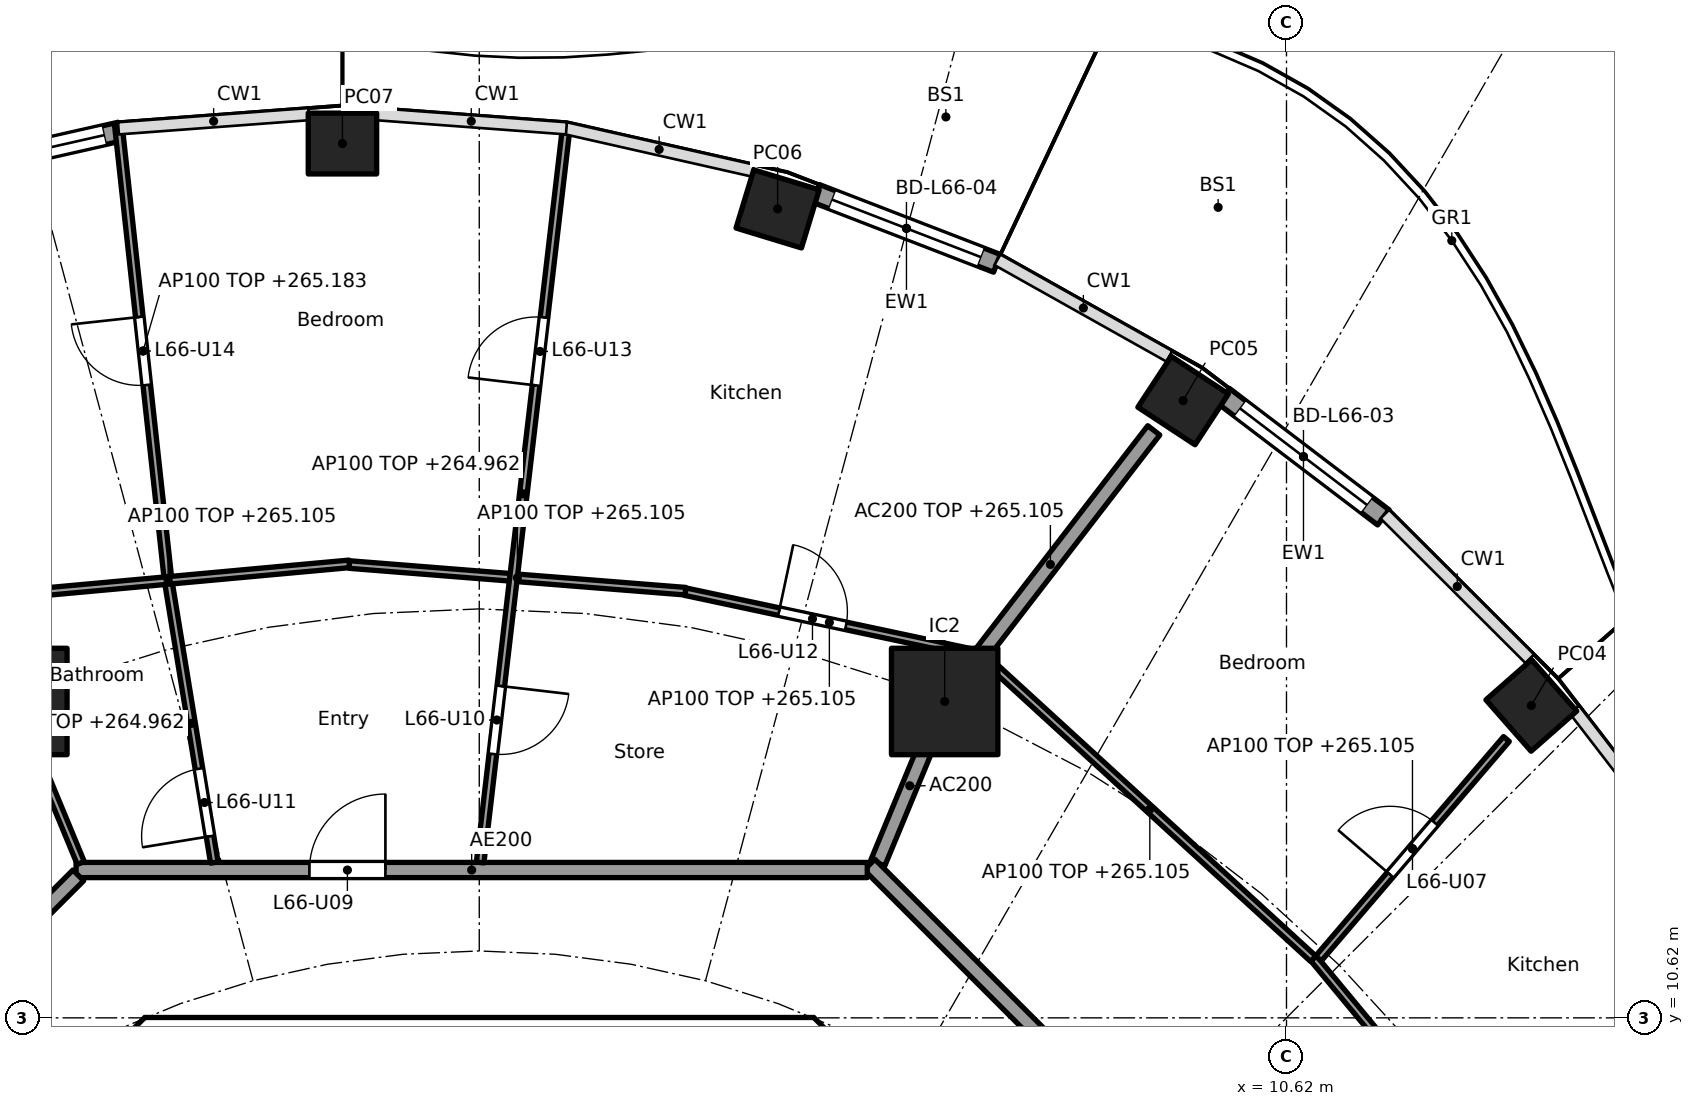
"""IFC4 building model, lengths in metres.
Left out: names, types, materials, properties, quantities, classifications, styles, units other than length and angle.
Written with IfcOpenShell. Run it as: python <this file> out.ifc"""

import sys

from ifc_helpers import new_model, si_unit, direction, frame, frame_2d, origin, origin_2d, place, context, subcontext, project, spatial, polyline, rectangle, hollow_rectangle, outline, extrude, element, fill, save


model = new_model("IFC4")
c1 = context("Model", 3, precision=1e-05, world=origin(), true_north=direction((0.0, 1.0)))
c2 = subcontext(c1, "Body", "Model", "MODEL_VIEW")
j1 = project(units=[si_unit("LENGTHUNIT", "METRE"), si_unit("PLANEANGLEUNIT", "RADIAN")], contexts=[c1])
p1 = place(None, origin())
s1 = spatial("IfcSite", under=j1, at=p1, CompositionType="ELEMENT")
p2 = place(p1, origin())
s2 = spatial("IfcBuilding", under=s1, at=p2, CompositionType="ELEMENT")
p3 = place(p2, frame((0.0, 0.0, 262.2)))
s3 = spatial("IfcBuildingStorey", under=s2, at=p3, CompositionType="ELEMENT", Elevation=262.2)
for number, where, z_axis, x_axis in (
    (1, (13.841, 14.73, 0.0), (0.0, 0.0, 1.0), (-0.66, 0.751, 0.0)),
    (2, (9.26, 18.741, 0.0), (0.0, 0.0, 1.0), (-0.836, 0.549, 0.0)),
    (3, (3.925, 21.262, 0.0), (0.0, 0.0, 1.0), (-0.957, 0.292, 0.0)),
    (4, (-1.8, 22.122, 0.0), (0.0, 0.0, 1.0), (-1.0, 0.0, 0.0)),
):
    element("IfcColumn", number, at=place(p3, frame(where, z_axis=z_axis, x_axis=x_axis)), inside=s3, PredefinedType="COLUMN", context=c2, shape_type="SweptSolid", body=[
        extrude(hollow_rectangle(XDim=0.9, YDim=0.8, WallThickness=0.028, at=origin_2d()), origin(), (0.0, 0.0, 1.0), 3.7),
    ])
for number, where, z_axis, x_axis in (
    (5, (6.123, 14.782, 0.0), (0.0, 0.0, 1.0), (1.0, 0.0, 0.0)),
    (6, (-6.123, 14.782, 0.0), (0.0, 0.0, 1.0), (1.0, 0.0, 0.0)),
):
    element("IfcColumn", number, at=place(p3, frame(where, z_axis=z_axis, x_axis=x_axis)), inside=s3, PredefinedType="COLUMN", context=c2, shape_type="SweptSolid", body=[
        extrude(rectangle(XDim=1.4, YDim=1.4, at=origin_2d()), origin(), (0.0, 0.0, 1.0), 3.7),
    ])
p4 = place(p3, frame((9.792, 18.802, 0.0), z_axis=(0.0, 0.0, 1.0), x_axis=(0.796010739377, -0.605282498339, 0.0)))
e7 = element("IfcWall", 7, at=p4, inside=s3, PredefinedType="SOLIDWALL", context=c2, shape_type="SweptSolid", body=[
    extrude(rectangle(XDim=2.641, YDim=0.25, at=frame_2d((1.32, 0.0))), origin(), (0.0, 0.0, 1.0), 3.44),
])
p5 = place(p4, frame((0.27, 0.0, 0.0)))
e8 = element("IfcOpeningElement", 8, at=p5, cuts=e7, PredefinedType="OPENING", context=c2, shape_type="SweptSolid", body=[
    extrude(rectangle(XDim=2.1, YDim=2.4, at=frame_2d((1.05, 1.2))), frame((0.0, 0.135, 0.0), z_axis=(0.0, -1.0, 0.0), x_axis=(1.0, 0.0, 0.0)), (0.0, 0.0, 1.0), 0.27),
])
p6 = place(p3, frame((4.429, 21.467, 0.0), z_axis=(0.0, 0.0, 1.0), x_axis=(0.93282223778, -0.360336887792, 0.0)))
e9 = element("IfcWall", 9, at=p6, inside=s3, PredefinedType="SOLIDWALL", context=c2, shape_type="SweptSolid", body=[
    extrude(rectangle(XDim=2.554, YDim=0.25, at=frame_2d((1.277, 0.0))), origin(), (0.0, 0.0, 1.0), 3.44),
])
p7 = place(p6, frame((0.227, 0.0, 0.0)))
e10 = element("IfcOpeningElement", 10, at=p7, cuts=e9, PredefinedType="OPENING", context=c2, shape_type="SweptSolid", body=[
    extrude(rectangle(XDim=2.1, YDim=2.4, at=frame_2d((1.05, 1.2))), frame((0.0, 0.135, 0.0), z_axis=(0.0, -1.0, 0.0), x_axis=(1.0, 0.0, 0.0)), (0.0, 0.0, 1.0), 0.27),
])
p8 = place(p3, frame((-7.188, 21.723, 0.0), z_axis=(0.0, 0.0, 1.0), x_axis=(0.975319584032, 0.220797891756, 0.0)))
e11 = element("IfcWall", 11, at=p8, inside=s3, PredefinedType="SOLIDWALL", context=c2, shape_type="SweptSolid", body=[
    extrude(rectangle(XDim=2.525, YDim=0.25, at=frame_2d((1.263, 0.0))), origin(), (0.0, 0.0, 1.0), 3.44),
])
p9 = place(p8, frame((0.213, 0.0, 0.0)))
e12 = element("IfcOpeningElement", 12, at=p9, cuts=e11, PredefinedType="OPENING", context=c2, shape_type="SweptSolid", body=[
    extrude(rectangle(XDim=2.1, YDim=2.4, at=frame_2d((1.05, 1.2))), frame((0.0, 0.135, 0.0), z_axis=(0.0, -1.0, 0.0), x_axis=(1.0, 0.0, 0.0)), (0.0, 0.0, 1.0), 0.27),
])
p10 = place(p3, origin())
e13 = element("IfcWall", 13, at=p10, inside=s3, PredefinedType="SHEAR", context=c2, shape_type="SweptSolid", body=[
    extrude(outline(polyline([(-4.152, 10.025), (-4.401, 9.776), (-4.825, 10.2), (-4.401, 10.625), (4.401, 10.625), (4.825, 10.2), (4.401, 9.776), (4.152, 10.025), (-4.152, 10.025)])), origin(), (0.0, 0.0, 1.0), 3.44),
])
p11 = place(p3, frame((5.243, 12.657, 0.0), z_axis=(0.0, 0.0, 1.0), x_axis=(0.382691608661, 0.923876145736, 0.0)))
e14 = element("IfcWall", 14, at=p11, inside=s3, PredefinedType="PARTITIONING", context=c2, shape_type="SweptSolid", body=[
    extrude(rectangle(XDim=2.2, YDim=0.2, at=frame_2d((1.1, 0.0))), origin(), (0.0, 0.0, 1.0), 3.44),
])
p12 = place(p3, frame((6.154, 14.822, 0.0), z_axis=(0.0, 0.0, 1.0), x_axis=(0.610687612043, 0.791871606068, 0.0)))
e15 = element("IfcWall", 15, at=p12, inside=s3, PredefinedType="PARTITIONING", context=c2, shape_type="SweptSolid", body=[
    extrude(rectangle(XDim=4.455, YDim=0.2, at=frame_2d((2.228, 0.0))), origin(), (0.0, 0.0, 1.0), 2.905),
])
p13 = place(p3, frame((12.635, 5.134, 0.0), z_axis=(0.0, 0.0, 1.0), x_axis=(-0.707106781187, 0.707106781187, 0.0)))
e16 = element("IfcWall", 16, at=p13, inside=s3, PredefinedType="PARTITIONING", context=c2, shape_type="SweptSolid", body=[
    extrude(rectangle(XDim=10.609, YDim=0.2, at=frame_2d((5.305, 0.0))), origin(), (0.0, 0.0, 1.0), 3.44),
])
p14 = place(p3, frame((5.104, 12.565, 0.0), z_axis=(0.0, 0.0, 1.0), x_axis=(-1.0, 0.0, 0.0)))
e17 = element("IfcWall", 17, at=p14, inside=s3, PredefinedType="PARTITIONING", context=c2, shape_type="SweptSolid", body=[
    extrude(rectangle(XDim=10.409, YDim=0.2, at=frame_2d((5.205, 0.0))), origin(), (0.0, 0.0, 1.0), 3.44),
])
p15 = place(p14, frame((6.339, 0.0, 0.0)))
e18 = element("IfcOpeningElement", 18, at=p15, cuts=e17, PredefinedType="OPENING", context=c2, shape_type="SweptSolid", body=[
    extrude(rectangle(XDim=1.0, YDim=2.1, at=frame_2d((0.5, 1.05))), frame((0.0, 0.11, 0.0), z_axis=(0.0, -1.0, 0.0), x_axis=(1.0, 0.0, 0.0)), (0.0, 0.0, 1.0), 0.22),
])
p16 = place(p3, frame((-5.275, 12.494, 0.0), z_axis=(0.0, 0.0, 1.0), x_axis=(-0.707106781187, -0.707106781187, 0.0)))
e19 = element("IfcWall", 19, at=p16, inside=s3, PredefinedType="PARTITIONING", context=c2, shape_type="SweptSolid", body=[
    extrude(rectangle(XDim=10.209, YDim=0.2, at=frame_2d((5.104, 0.0))), origin(), (0.0, 0.0, 1.0), 3.44),
])
p17 = place(p3, frame((15.098, 6.427, 0.0), z_axis=(0.0, 0.0, 1.0), x_axis=(-0.637936555536, 0.770088924158, 0.0)))
e20 = element("IfcWall", 20, at=p17, inside=s3, PredefinedType="PARTITIONING", context=c2, shape_type="SweptSolid", body=[
    extrude(rectangle(XDim=6.46, YDim=0.1, at=frame_2d((3.23, 0.0))), origin(), (0.0, 0.0, 1.0), 2.905),
])
p18 = place(p17, frame((2.78, 0.0, 0.0)))
e21 = element("IfcOpeningElement", 21, at=p18, cuts=e20, PredefinedType="OPENING", context=c2, shape_type="SweptSolid", body=[
    extrude(rectangle(XDim=0.9, YDim=2.1, at=frame_2d((0.45, 1.05))), frame((0.0, 0.06, 0.0), z_axis=(0.0, -1.0, 0.0), x_axis=(1.0, 0.0, 0.0)), (0.0, 0.0, 1.0), 0.12),
])
p19 = place(p3, frame((11.041, 11.402, 0.0), z_axis=(0.0, 0.0, 1.0), x_axis=(0.650558544325, 0.759456108282, 0.0)))
e22 = element("IfcWall", 22, at=p19, inside=s3, PredefinedType="PARTITIONING", context=c2, shape_type="SweptSolid", body=[
    extrude(rectangle(XDim=3.8, YDim=0.1, at=frame_2d((1.9, 0.0))), origin(), (0.0, 0.0, 1.0), 2.905),
])
p20 = place(p19, frame((1.45, 0.0, 0.0)))
e23 = element("IfcOpeningElement", 23, at=p20, cuts=e22, PredefinedType="OPENING", context=c2, shape_type="SweptSolid", body=[
    extrude(rectangle(XDim=0.9, YDim=2.1, at=frame_2d((0.45, 1.05))), frame((0.0, 0.06, 0.0), z_axis=(0.0, -1.0, 0.0), x_axis=(1.0, 0.0, 0.0)), (0.0, 0.0, 1.0), 0.12),
])
p21 = place(p3, frame((10.972, 11.398, 0.0), z_axis=(0.0, 0.0, 1.0), x_axis=(-0.737830272434, 0.674986288069, 0.0)))
e24 = element("IfcWall", 24, at=p21, inside=s3, PredefinedType="PARTITIONING", context=c2, shape_type="SweptSolid", body=[
    extrude(rectangle(XDim=5.827, YDim=0.1, at=frame_2d((2.914, 0.0))), origin(), (0.0, 0.0, 1.0), 2.905),
])
p22 = place(p3, frame((6.5, 15.419, 0.0), z_axis=(0.0, 0.0, 1.0), x_axis=(-0.978053492557, 0.208353943321, 0.0)))
e25 = element("IfcWall", 25, at=p22, inside=s3, PredefinedType="PARTITIONING", context=c2, shape_type="SweptSolid", body=[
    extrude(rectangle(XDim=3.874, YDim=0.1, at=frame_2d((1.937, 0.0))), origin(), (0.0, 0.0, 1.0), 2.905),
])
p23 = place(p22, frame((1.714, 0.0, 0.0)))
e26 = element("IfcOpeningElement", 26, at=p23, cuts=e25, PredefinedType="OPENING", context=c2, shape_type="SweptSolid", body=[
    extrude(rectangle(XDim=0.9, YDim=2.1, at=frame_2d((0.45, 1.05))), frame((0.0, 0.06, 0.0), z_axis=(0.0, -1.0, 0.0), x_axis=(1.0, 0.0, 0.0)), (0.0, 0.0, 1.0), 0.12),
])
p24 = place(p3, frame((2.713, 16.233, 0.0), z_axis=(0.0, 0.0, 1.0), x_axis=(-0.996870142942, 0.079056423588, 0.0)))
e27 = element("IfcWall", 27, at=p24, inside=s3, PredefinedType="PARTITIONING", context=c2, shape_type="SweptSolid", body=[
    extrude(rectangle(XDim=4.438, YDim=0.1, at=frame_2d((2.219, 0.0))), origin(), (0.0, 0.0, 1.0), 2.905),
])
p25 = place(p3, frame((0.012, 12.664, 0.0), z_axis=(0.0, 0.0, 1.0), x_axis=(0.11636251357, 0.993206808996, 0.0)))
e28 = element("IfcWall", 28, at=p25, inside=s3, PredefinedType="PARTITIONING", context=c2, shape_type="SweptSolid", body=[
    extrude(rectangle(XDim=9.765, YDim=0.1, at=frame_2d((4.882, 0.0))), origin(), (0.0, 0.0, 1.0), 2.762),
])
p26 = place(p25, frame((1.437, 0.0, 0.0)))
e29 = element("IfcOpeningElement", 29, at=p26, cuts=e28, PredefinedType="OPENING", context=c2, shape_type="SweptSolid", body=[
    extrude(rectangle(XDim=0.9, YDim=2.1, at=frame_2d((0.45, 1.05))), frame((0.0, 0.06, 0.0), z_axis=(0.0, -1.0, 0.0), x_axis=(1.0, 0.0, 0.0)), (0.0, 0.0, 1.0), 0.12),
])
p27 = place(p25, frame((6.319, 0.0, 0.0)))
e30 = element("IfcOpeningElement", 30, at=p27, cuts=e28, PredefinedType="OPENING", context=c2, shape_type="SweptSolid", body=[
    extrude(rectangle(XDim=0.9, YDim=2.1, at=frame_2d((0.45, 1.05))), frame((0.0, 0.06, 0.0), z_axis=(0.0, -1.0, 0.0), x_axis=(1.0, 0.0, 0.0)), (0.0, 0.0, 1.0), 0.12),
])
p28 = place(p3, frame((-1.711, 16.592, 0.0), z_axis=(0.0, 0.0, 1.0), x_axis=(-0.995843707015, -0.091078599017, 0.0)))
e31 = element("IfcWall", 31, at=p28, inside=s3, PredefinedType="PARTITIONING", context=c2, shape_type="SweptSolid", body=[
    extrude(rectangle(XDim=4.785, YDim=0.1, at=frame_2d((2.392, 0.0))), origin(), (0.0, 0.0, 1.0), 2.905),
])
p29 = place(p3, frame((-3.486, 12.663, 0.0), z_axis=(0.0, 0.0, 1.0), x_axis=(-0.161602751674, 0.986855891532, 0.0)))
e32 = element("IfcWall", 32, at=p29, inside=s3, PredefinedType="PARTITIONING", context=c2, shape_type="SweptSolid", body=[
    extrude(rectangle(XDim=3.71, YDim=0.1, at=frame_2d((1.855, 0.0))), origin(), (0.0, 0.0, 1.0), 2.762),
])
p30 = place(p29, frame((0.35, 0.0, 0.0)))
e33 = element("IfcOpeningElement", 33, at=p30, cuts=e32, PredefinedType="OPENING", context=c2, shape_type="SweptSolid", body=[
    extrude(rectangle(XDim=0.9, YDim=2.1, at=frame_2d((0.45, 1.05))), frame((0.0, 0.06, 0.0), z_axis=(0.0, -1.0, 0.0), x_axis=(1.0, 0.0, 0.0)), (0.0, 0.0, 1.0), 0.12),
])
p31 = place(p3, frame((-4.099, 16.424, 0.0), z_axis=(0.0, 0.0, 1.0), x_axis=(-0.10867295252, 0.99407755703, 0.0)))
e34 = element("IfcWall", 34, at=p31, inside=s3, PredefinedType="PARTITIONING", context=c2, shape_type="SweptSolid", body=[
    extrude(rectangle(XDim=5.974, YDim=0.1, at=frame_2d((2.987, 0.0))), origin(), (0.0, 0.0, 1.0), 2.983),
])
p32 = place(p31, frame((2.537, 0.0, 0.0)))
e35 = element("IfcOpeningElement", 35, at=p32, cuts=e34, PredefinedType="OPENING", context=c2, shape_type="SweptSolid", body=[
    extrude(rectangle(XDim=0.9, YDim=2.1, at=frame_2d((0.45, 1.05))), frame((0.0, 0.06, 0.0), z_axis=(0.0, -1.0, 0.0), x_axis=(1.0, 0.0, 0.0)), (0.0, 0.0, 1.0), 0.12),
])
p33 = place(p3, frame((-5.243, 12.657, 0.0), z_axis=(0.0, 0.0, 1.0), x_axis=(-0.382719158442, 0.923864733477, 0.0)))
e36 = element("IfcWall", 36, at=p33, inside=s3, PredefinedType="PARTITIONING", context=c2, shape_type="SweptSolid", body=[
    extrude(rectangle(XDim=2.25, YDim=0.1, at=frame_2d((1.125, 0.0))), origin(), (0.0, 0.0, 1.0), 3.44),
])
p34 = place(p5, origin())
e37 = element("IfcDoor", 37, at=p34, inside=s3, OperationType="SLIDING_TO_LEFT", PredefinedType="DOOR", context=c2, shape_type="SweptSolid", body=[
    extrude(rectangle(XDim=2.1, YDim=2.4, at=frame_2d((1.05, 1.2))), frame((0.0, 0.025, 0.0), z_axis=(0.0, -1.0, 0.0), x_axis=(1.0, 0.0, 0.0)), (0.0, 0.0, 1.0), 0.05),
])
fill(e8, e37)
p35 = place(p7, origin())
e38 = element("IfcDoor", 38, at=p35, inside=s3, OperationType="SLIDING_TO_LEFT", PredefinedType="DOOR", context=c2, shape_type="SweptSolid", body=[
    extrude(rectangle(XDim=2.1, YDim=2.4, at=frame_2d((1.05, 1.2))), frame((0.0, 0.025, 0.0), z_axis=(0.0, -1.0, 0.0), x_axis=(1.0, 0.0, 0.0)), (0.0, 0.0, 1.0), 0.05),
])
fill(e10, e38)
p36 = place(p9, origin())
e39 = element("IfcDoor", 39, at=p36, inside=s3, OperationType="SLIDING_TO_LEFT", PredefinedType="DOOR", context=c2, shape_type="SweptSolid", body=[
    extrude(rectangle(XDim=2.1, YDim=2.4, at=frame_2d((1.05, 1.2))), frame((0.0, 0.025, 0.0), z_axis=(0.0, -1.0, 0.0), x_axis=(1.0, 0.0, 0.0)), (0.0, 0.0, 1.0), 0.05),
])
fill(e12, e39)
p37 = place(p20, origin())
e40 = element("IfcDoor", 40, at=p37, inside=s3, OperationType="SINGLE_SWING_LEFT", PredefinedType="DOOR", context=c2, shape_type="SweptSolid", body=[
    extrude(rectangle(XDim=0.9, YDim=2.1, at=frame_2d((0.45, 1.05))), frame((0.0, 0.025, 0.0), z_axis=(0.0, -1.0, 0.0), x_axis=(1.0, 0.0, 0.0)), (0.0, 0.0, 1.0), 0.05),
])
fill(e23, e40)
p38 = place(p15, frame((1.0, 0.0, 0.0), x_axis=(-1.0, 0.0, 0.0)))
e41 = element("IfcDoor", 41, at=p38, inside=s3, OperationType="SINGLE_SWING_RIGHT", PredefinedType="DOOR", context=c2, shape_type="SweptSolid", body=[
    extrude(rectangle(XDim=1.0, YDim=2.1, at=frame_2d((0.5, 1.05))), frame((0.0, 0.025, 0.0), z_axis=(0.0, -1.0, 0.0), x_axis=(1.0, 0.0, 0.0)), (0.0, 0.0, 1.0), 0.05),
])
fill(e18, e41)
p39 = place(p26, frame((0.9, 0.0, 0.0), x_axis=(-1.0, 0.0, 0.0)))
e42 = element("IfcDoor", 42, at=p39, inside=s3, OperationType="SINGLE_SWING_LEFT", PredefinedType="DOOR", context=c2, shape_type="SweptSolid", body=[
    extrude(rectangle(XDim=0.9, YDim=2.1, at=frame_2d((0.45, 1.05))), frame((0.0, 0.025, 0.0), z_axis=(0.0, -1.0, 0.0), x_axis=(1.0, 0.0, 0.0)), (0.0, 0.0, 1.0), 0.05),
])
fill(e29, e42)
p40 = place(p30, origin())
e43 = element("IfcDoor", 43, at=p40, inside=s3, OperationType="SINGLE_SWING_LEFT", PredefinedType="DOOR", context=c2, shape_type="SweptSolid", body=[
    extrude(rectangle(XDim=0.9, YDim=2.1, at=frame_2d((0.45, 1.05))), frame((0.0, 0.025, 0.0), z_axis=(0.0, -1.0, 0.0), x_axis=(1.0, 0.0, 0.0)), (0.0, 0.0, 1.0), 0.05),
])
fill(e33, e43)
p41 = place(p23, frame((0.9, 0.0, 0.0), x_axis=(-1.0, 0.0, 0.0)))
e44 = element("IfcDoor", 44, at=p41, inside=s3, OperationType="SINGLE_SWING_LEFT", PredefinedType="DOOR", context=c2, shape_type="SweptSolid", body=[
    extrude(rectangle(XDim=0.9, YDim=2.1, at=frame_2d((0.45, 1.05))), frame((0.0, 0.025, 0.0), z_axis=(0.0, -1.0, 0.0), x_axis=(1.0, 0.0, 0.0)), (0.0, 0.0, 1.0), 0.05),
])
fill(e26, e44)
p42 = place(p27, origin())
e45 = element("IfcDoor", 45, at=p42, inside=s3, OperationType="SINGLE_SWING_LEFT", PredefinedType="DOOR", context=c2, shape_type="SweptSolid", body=[
    extrude(rectangle(XDim=0.9, YDim=2.1, at=frame_2d((0.45, 1.05))), frame((0.0, 0.025, 0.0), z_axis=(0.0, -1.0, 0.0), x_axis=(1.0, 0.0, 0.0)), (0.0, 0.0, 1.0), 0.05),
])
fill(e30, e45)
p43 = place(p32, origin())
e46 = element("IfcDoor", 46, at=p43, inside=s3, OperationType="SINGLE_SWING_RIGHT", PredefinedType="DOOR", context=c2, shape_type="SweptSolid", body=[
    extrude(rectangle(XDim=0.9, YDim=2.1, at=frame_2d((0.45, 1.05))), frame((0.0, 0.025, 0.0), z_axis=(0.0, -1.0, 0.0), x_axis=(1.0, 0.0, 0.0)), (0.0, 0.0, 1.0), 0.05),
])
fill(e35, e46)
save(model, sys.argv[1])
